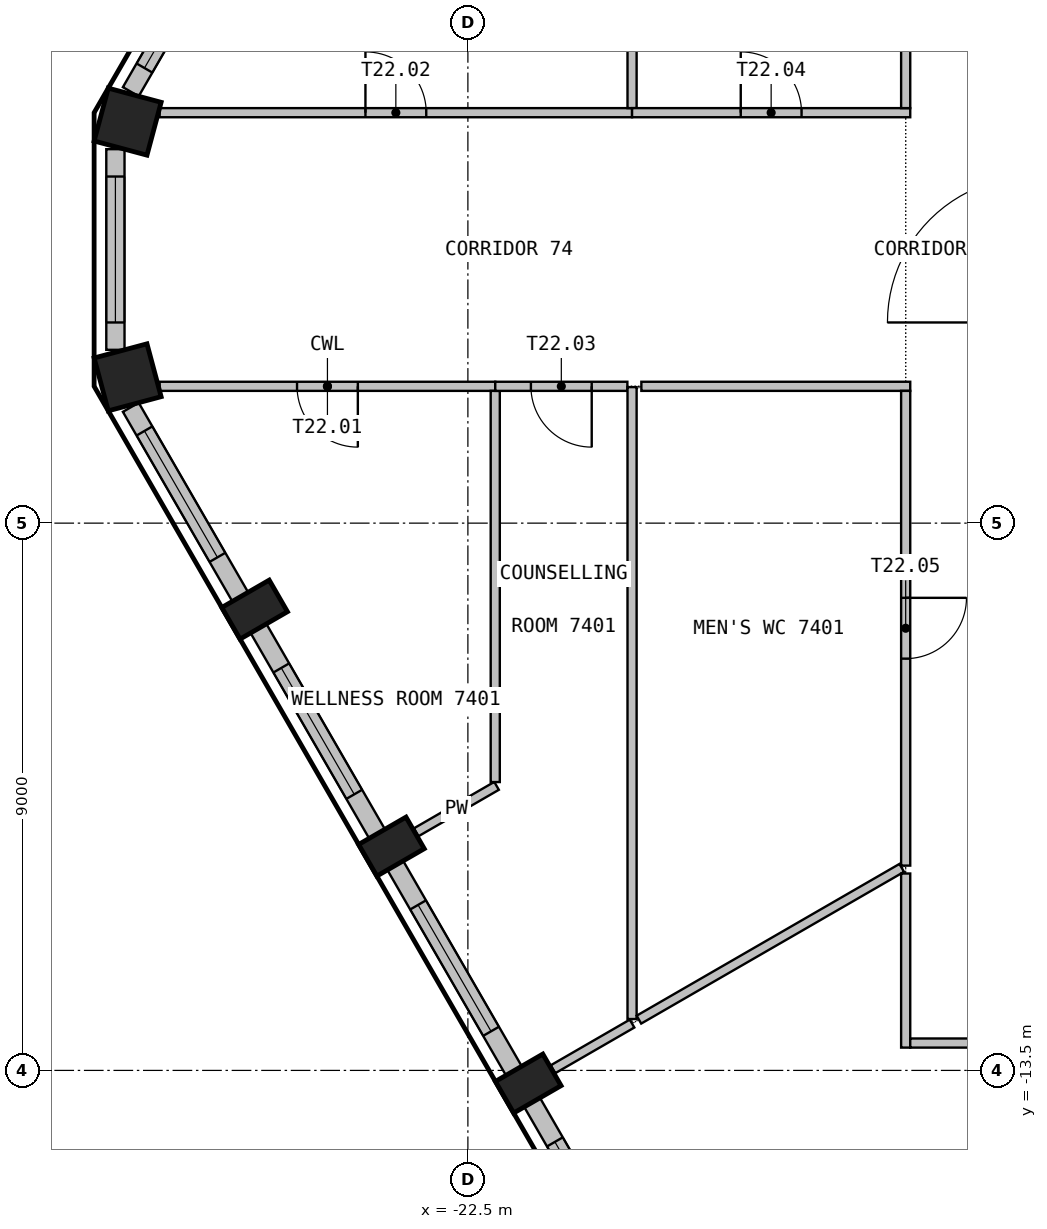
"""IFC4 building model, lengths in metres.
Left out: names, types, materials, properties, quantities, classifications, styles, units other than length and angle.
Written with IfcOpenShell. Run it as: python <this file> out.ifc"""

import sys

from ifc_helpers import new_model, si_unit, direction, frame, frame_2d, origin, origin_2d, place, context, subcontext, project, spatial, rectangle, extrude, element, fill, save


model = new_model("IFC4")
c1 = context("Model", 3, precision=1e-05, world=origin(), true_north=direction((0.0, 1.0)))
c2 = subcontext(c1, "Body", "Model", "MODEL_VIEW")
j1 = project(units=[si_unit("LENGTHUNIT", "METRE"), si_unit("PLANEANGLEUNIT", "RADIAN")], contexts=[c1])
p1 = place(None, origin())
s1 = spatial("IfcSite", under=j1, at=p1, CompositionType="ELEMENT")
p2 = place(p1, origin())
s2 = spatial("IfcBuilding", under=s1, at=p2, CompositionType="ELEMENT")
p3 = place(p2, frame((0.0, 0.0, 298.2)))
s3 = spatial("IfcBuildingStorey", under=s2, at=p3, CompositionType="ELEMENT", Elevation=298.2)
for number, where, z_axis, x_axis in (
    (1, (-28.096, 2.102, 0.0), (0.0, 0.0, 1.0), (-0.259, -0.966, 0.0)),
    (2, (-28.096, -2.102, 0.0), (0.0, 0.0, 1.0), (0.259, -0.966, 0.0)),
):
    element("IfcColumn", number, at=place(p3, frame(where, z_axis=z_axis, x_axis=x_axis)), inside=s3, PredefinedType="COLUMN", context=c2, shape_type="SweptSolid", body=[
        extrude(rectangle(XDim=0.9, YDim=0.9, at=origin_2d()), origin(), (0.0, 0.0, 1.0), 3.575),
    ])
for number, where, z_axis, x_axis in (
    (3, (-26.007, -5.922, 0.0), (0.0, 0.0, 1.0), (0.5, -0.866, 0.0)),
    (4, (-23.757, -9.819, 0.0), (0.0, 0.0, 1.0), (0.5, -0.866, 0.0)),
    (5, (-21.507, -13.716, 0.0), (0.0, 0.0, 1.0), (0.5, -0.866, 0.0)),
):
    element("IfcColumn", number, at=place(p3, frame(where, z_axis=z_axis, x_axis=x_axis)), inside=s3, PredefinedType="COLUMN", context=c2, shape_type="SweptSolid", body=[
        extrude(rectangle(XDim=0.6, YDim=0.9, at=origin_2d()), origin(), (0.0, 0.0, 1.0), 3.575),
    ])
p4 = place(p3, frame((-26.244, 5.712, 0.0), z_axis=(0.0, 0.0, 1.0), x_axis=(-0.499969057507, -0.866043267704, 0.0)))
e6 = element("IfcWall", 6, at=p4, inside=s3, PredefinedType="SOLIDWALL", context=c2, shape_type="SweptSolid", body=[
    extrude(rectangle(XDim=3.599, YDim=0.3, at=frame_2d((1.8, 0.0))), origin(), (0.0, 0.0, 1.0), 3.575),
])
p5 = place(p4, frame((0.75, 0.0, 0.9)))
e7 = element("IfcOpeningElement", 7, at=p5, cuts=e6, PredefinedType="OPENING", context=c2, shape_type="SweptSolid", body=[
    extrude(rectangle(XDim=2.4, YDim=2.1, at=frame_2d((1.2, 1.05))), frame((0.0, 0.16, 0.0), z_axis=(0.0, -1.0, 0.0), x_axis=(1.0, 0.0, 0.0)), (0.0, 0.0, 1.0), 0.32),
])
p6 = place(p3, frame((-28.297, 1.65, 0.0), z_axis=(0.0, 0.0, 1.0), x_axis=(0.0, -1.0, 0.0)))
e8 = element("IfcWall", 8, at=p6, inside=s3, PredefinedType="SOLIDWALL", context=c2, shape_type="SweptSolid", body=[
    extrude(rectangle(XDim=3.3, YDim=0.3, at=frame_2d((1.65, 0.0))), origin(), (0.0, 0.0, 1.0), 3.575),
])
p7 = place(p6, frame((0.45, 0.0, 0.9)))
e9 = element("IfcOpeningElement", 9, at=p7, cuts=e8, PredefinedType="OPENING", context=c2, shape_type="SweptSolid", body=[
    extrude(rectangle(XDim=2.4, YDim=2.1, at=frame_2d((1.2, 1.05))), frame((0.0, 0.16, 0.0), z_axis=(0.0, -1.0, 0.0), x_axis=(1.0, 0.0, 0.0)), (0.0, 0.0, 1.0), 0.32),
])
p8 = place(p3, frame((-28.044, -2.595, 0.0), z_axis=(0.0, 0.0, 1.0), x_axis=(0.499969057507, -0.866043267704, 0.0)))
e10 = element("IfcWall", 10, at=p8, inside=s3, PredefinedType="SOLIDWALL", context=c2, shape_type="SweptSolid", body=[
    extrude(rectangle(XDim=3.599, YDim=0.3, at=frame_2d((1.8, 0.0))), origin(), (0.0, 0.0, 1.0), 3.575),
])
p9 = place(p8, frame((0.45, 0.0, 0.9)))
e11 = element("IfcOpeningElement", 11, at=p9, cuts=e10, PredefinedType="OPENING", context=c2, shape_type="SweptSolid", body=[
    extrude(rectangle(XDim=2.4, YDim=2.1, at=frame_2d((1.2, 1.05))), frame((0.0, 0.16, 0.0), z_axis=(0.0, -1.0, 0.0), x_axis=(1.0, 0.0, 0.0)), (0.0, 0.0, 1.0), 0.32),
])
p10 = place(p3, frame((-25.944, -6.232, 0.0), z_axis=(0.0, 0.0, 1.0), x_axis=(0.500011542666, -0.866018739521, 0.0)))
e12 = element("IfcWall", 12, at=p10, inside=s3, PredefinedType="SOLIDWALL", context=c2, shape_type="SweptSolid", body=[
    extrude(rectangle(XDim=3.899, YDim=0.3, at=frame_2d((1.949, 0.0))), origin(), (0.0, 0.0, 1.0), 3.575),
])
p11 = place(p10, frame((0.75, 0.0, 0.9)))
e13 = element("IfcOpeningElement", 13, at=p11, cuts=e12, PredefinedType="OPENING", context=c2, shape_type="SweptSolid", body=[
    extrude(rectangle(XDim=2.4, YDim=2.1, at=frame_2d((1.2, 1.05))), frame((0.0, 0.16, 0.0), z_axis=(0.0, -1.0, 0.0), x_axis=(1.0, 0.0, 0.0)), (0.0, 0.0, 1.0), 0.32),
])
p12 = place(p3, frame((-23.694, -10.129, 0.0), z_axis=(0.0, 0.0, 1.0), x_axis=(0.499984428715, -0.866034393683, 0.0)))
e14 = element("IfcWall", 14, at=p12, inside=s3, PredefinedType="SOLIDWALL", context=c2, shape_type="SweptSolid", body=[
    extrude(rectangle(XDim=3.899, YDim=0.3, at=frame_2d((1.949, 0.0))), origin(), (0.0, 0.0, 1.0), 3.575),
])
p13 = place(p12, frame((0.75, 0.0, 0.9)))
e15 = element("IfcOpeningElement", 15, at=p13, cuts=e14, PredefinedType="OPENING", context=c2, shape_type="SweptSolid", body=[
    extrude(rectangle(XDim=2.4, YDim=2.1, at=frame_2d((1.2, 1.05))), frame((0.0, 0.16, 0.0), z_axis=(0.0, -1.0, 0.0), x_axis=(1.0, 0.0, 0.0)), (0.0, 0.0, 1.0), 0.32),
])
p14 = place(p3, frame((-21.444, -14.027, 0.0), z_axis=(0.0, 0.0, 1.0), x_axis=(0.50001992892, -0.866013897511, 0.0)))
e16 = element("IfcWall", 16, at=p14, inside=s3, PredefinedType="SOLIDWALL", context=c2, shape_type="SweptSolid", body=[
    extrude(rectangle(XDim=3.599, YDim=0.3, at=frame_2d((1.8, 0.0))), origin(), (0.0, 0.0, 1.0), 3.575),
])
p15 = place(p14, frame((0.75, 0.0, 0.9)))
e17 = element("IfcOpeningElement", 17, at=p15, cuts=e16, PredefinedType="OPENING", context=c2, shape_type="SweptSolid", body=[
    extrude(rectangle(XDim=2.4, YDim=2.1, at=frame_2d((1.2, 1.05))), frame((0.0, 0.16, 0.0), z_axis=(0.0, -1.0, 0.0), x_axis=(1.0, 0.0, 0.0)), (0.0, 0.0, 1.0), 0.32),
])
p16 = place(p3, frame((-22.05, -2.25, 0.0), z_axis=(0.0, 0.0, 1.0), x_axis=(-1.0, 0.0, 0.0)))
e18 = element("IfcWall", 18, at=p16, inside=s3, PredefinedType="PARTITIONING", context=c2, shape_type="SweptSolid", body=[
    extrude(rectangle(XDim=5.52, YDim=0.15, at=frame_2d((2.76, 0.0))), origin(), (0.0, 0.0, 1.0), 3.575),
])
p17 = place(p16, frame((2.26, 0.0, 0.0)))
e19 = element("IfcOpeningElement", 19, at=p17, cuts=e18, PredefinedType="OPENING", context=c2, shape_type="SweptSolid", body=[
    extrude(rectangle(XDim=1.0, YDim=2.1, at=frame_2d((0.5, 1.05))), frame((0.0, 0.085, 0.0), z_axis=(0.0, -1.0, 0.0), x_axis=(1.0, 0.0, 0.0)), (0.0, 0.0, 1.0), 0.17),
])
p18 = place(p3, frame((-27.57, 2.25, 0.0), z_axis=(0.0, 0.0, 1.0), x_axis=(1.0, 0.0, 0.0)))
e20 = element("IfcWall", 20, at=p18, inside=s3, PredefinedType="PARTITIONING", context=c2, shape_type="SweptSolid", body=[
    extrude(rectangle(XDim=7.77, YDim=0.15, at=frame_2d((3.885, 0.0))), origin(), (0.0, 0.0, 1.0), 3.575),
])
p19 = place(p18, frame((3.385, 0.0, 0.0)))
e21 = element("IfcOpeningElement", 21, at=p19, cuts=e20, PredefinedType="OPENING", context=c2, shape_type="SweptSolid", body=[
    extrude(rectangle(XDim=1.0, YDim=2.1, at=frame_2d((0.5, 1.05))), frame((0.0, 0.085, 0.0), z_axis=(0.0, -1.0, 0.0), x_axis=(1.0, 0.0, 0.0)), (0.0, 0.0, 1.0), 0.17),
])
p20 = place(p3, frame((-22.028, -8.821, 0.0), z_axis=(0.0, 0.0, 1.0), x_axis=(-0.86598050703, -0.500077755398, 0.0)))
e22 = element("IfcWall", 22, at=p20, inside=s3, PredefinedType="PARTITIONING", context=c2, shape_type="SweptSolid", body=[
    extrude(rectangle(XDim=1.527, YDim=0.15, at=frame_2d((0.763, 0.0))), origin(), (0.0, 0.0, 1.0), 3.575),
])
p21 = place(p3, frame((-22.05, -2.325, 0.0), z_axis=(0.0, 0.0, 1.0), x_axis=(0.0, -1.0, 0.0)))
e23 = element("IfcWall", 23, at=p21, inside=s3, PredefinedType="PARTITIONING", context=c2, shape_type="SweptSolid", body=[
    extrude(rectangle(XDim=6.433, YDim=0.15, at=frame_2d((3.217, 0.0))), origin(), (0.0, 0.0, 1.0), 3.575),
])
p22 = place(p3, frame((-19.877, -2.25, 0.0), z_axis=(0.0, 0.0, 1.0), x_axis=(-1.0, 0.0, 0.0)))
e24 = element("IfcWall", 24, at=p22, inside=s3, PredefinedType="PARTITIONING", context=c2, shape_type="SweptSolid", body=[
    extrude(rectangle(XDim=2.173, YDim=0.15, at=frame_2d((1.086, 0.0))), origin(), (0.0, 0.0, 1.0), 3.575),
])
p23 = place(p22, frame((0.586, 0.0, 0.0)))
e25 = element("IfcOpeningElement", 25, at=p23, cuts=e24, PredefinedType="OPENING", context=c2, shape_type="SweptSolid", body=[
    extrude(rectangle(XDim=1.0, YDim=2.1, at=frame_2d((0.5, 1.05))), frame((0.0, 0.085, 0.0), z_axis=(0.0, -1.0, 0.0), x_axis=(1.0, 0.0, 0.0)), (0.0, 0.0, 1.0), 0.17),
])
p24 = place(p3, frame((-19.8, -12.73, 0.0), z_axis=(0.0, 0.0, 1.0), x_axis=(-0.865922963245, -0.500177390258, 0.0)))
e26 = element("IfcWall", 26, at=p24, inside=s3, PredefinedType="PARTITIONING", context=c2, shape_type="SweptSolid", body=[
    extrude(rectangle(XDim=1.502, YDim=0.15, at=frame_2d((0.751, 0.0))), origin(), (0.0, 0.0, 1.0), 3.575),
])
p25 = place(p3, frame((-19.8, -2.263, 0.0), z_axis=(0.0, 0.0, 1.0), x_axis=(0.0, -1.0, 0.0)))
e27 = element("IfcWall", 27, at=p25, inside=s3, PredefinedType="PARTITIONING", context=c2, shape_type="SweptSolid", body=[
    extrude(rectangle(XDim=10.392, YDim=0.15, at=frame_2d((5.196, 0.0))), origin(), (0.0, 0.0, 1.0), 3.575),
])
p26 = place(p3, frame((-15.365, -10.169, 0.0), z_axis=(0.0, 0.0, 1.0), x_axis=(-0.866025118187, -0.500000494669, 0.0)))
e28 = element("IfcWall", 28, at=p26, inside=s3, PredefinedType="PARTITIONING", context=c2, shape_type="SweptSolid", body=[
    extrude(rectangle(XDim=4.991, YDim=0.15, at=frame_2d((2.496, 0.0))), origin(), (0.0, 0.0, 1.0), 3.575),
])
p27 = place(p3, frame((-19.8, 7.459, 0.0), z_axis=(0.0, 0.0, 1.0), x_axis=(0.0, -1.0, 0.0)))
e29 = element("IfcWall", 29, at=p27, inside=s3, PredefinedType="PARTITIONING", context=c2, shape_type="SweptSolid", body=[
    extrude(rectangle(XDim=5.134, YDim=0.15, at=frame_2d((2.567, 0.0))), origin(), (0.0, 0.0, 1.0), 3.575),
])
p28 = place(p3, frame((-19.8, 2.25, 0.0), z_axis=(0.0, 0.0, 1.0), x_axis=(1.0, 0.0, 0.0)))
e30 = element("IfcWall", 30, at=p28, inside=s3, PredefinedType="PARTITIONING", context=c2, shape_type="SweptSolid", body=[
    extrude(rectangle(XDim=4.575, YDim=0.15, at=frame_2d((2.288, 0.0))), origin(), (0.0, 0.0, 1.0), 3.575),
])
p29 = place(p28, frame((1.788, 0.0, 0.0)))
e31 = element("IfcOpeningElement", 31, at=p29, cuts=e30, PredefinedType="OPENING", context=c2, shape_type="SweptSolid", body=[
    extrude(rectangle(XDim=1.0, YDim=2.1, at=frame_2d((0.5, 1.05))), frame((0.0, 0.085, 0.0), z_axis=(0.0, -1.0, 0.0), x_axis=(1.0, 0.0, 0.0)), (0.0, 0.0, 1.0), 0.17),
])
p30 = place(p3, frame((-15.225, -2.25, 0.0), z_axis=(0.0, 0.0, 1.0), x_axis=(-1.0, 0.0, 0.0)))
e32 = element("IfcWall", 32, at=p30, inside=s3, PredefinedType="PARTITIONING", context=c2, shape_type="SweptSolid", body=[
    extrude(rectangle(XDim=4.422, YDim=0.15, at=frame_2d((2.211, 0.0))), origin(), (0.0, 0.0, 1.0), 3.575),
])
p31 = place(p3, frame((-15.3, -10.262, 0.0), z_axis=(0.0, 0.0, 1.0), x_axis=(0.0, -1.0, 0.0)))
e33 = element("IfcWall", 33, at=p31, inside=s3, PredefinedType="PARTITIONING", context=c2, shape_type="SweptSolid", body=[
    extrude(rectangle(XDim=2.863, YDim=0.15, at=frame_2d((1.432, 0.0))), origin(), (0.0, 0.0, 1.0), 3.575),
])
p32 = place(p3, frame((-15.225, -13.05, 0.0), z_axis=(0.0, 0.0, 1.0), x_axis=(1.0, 0.0, 0.0)))
e34 = element("IfcWall", 34, at=p32, inside=s3, PredefinedType="PARTITIONING", context=c2, shape_type="SweptSolid", body=[
    extrude(rectangle(XDim=3.975, YDim=0.15, at=frame_2d((1.988, 0.0))), origin(), (0.0, 0.0, 1.0), 3.575),
])
p33 = place(p32, frame((1.488, 0.0, 0.0)))
e35 = element("IfcOpeningElement", 35, at=p33, cuts=e34, PredefinedType="OPENING", context=c2, shape_type="SweptSolid", body=[
    extrude(rectangle(XDim=1.0, YDim=2.1, at=frame_2d((0.5, 1.05))), frame((0.0, 0.085, 0.0), z_axis=(0.0, -1.0, 0.0), x_axis=(1.0, 0.0, 0.0)), (0.0, 0.0, 1.0), 0.17),
])
p34 = place(p3, frame((-15.3, -2.325, 0.0), z_axis=(0.0, 0.0, 1.0), x_axis=(0.0, -1.0, 0.0)))
e36 = element("IfcWall", 36, at=p34, inside=s3, PredefinedType="PARTITIONING", context=c2, shape_type="SweptSolid", body=[
    extrude(rectangle(XDim=7.807, YDim=0.15, at=frame_2d((3.904, 0.0))), origin(), (0.0, 0.0, 1.0), 3.575),
])
p35 = place(p34, frame((3.404, 0.0, 0.0)))
e37 = element("IfcOpeningElement", 37, at=p35, cuts=e36, PredefinedType="OPENING", context=c2, shape_type="SweptSolid", body=[
    extrude(rectangle(XDim=1.0, YDim=2.1, at=frame_2d((0.5, 1.05))), frame((0.0, 0.085, 0.0), z_axis=(0.0, -1.0, 0.0), x_axis=(1.0, 0.0, 0.0)), (0.0, 0.0, 1.0), 0.17),
])
p36 = place(p3, frame((-15.3, 4.936, 0.0), z_axis=(0.0, 0.0, 1.0), x_axis=(0.0, -1.0, 0.0)))
e38 = element("IfcWall", 38, at=p36, inside=s3, PredefinedType="PARTITIONING", context=c2, shape_type="SweptSolid", body=[
    extrude(rectangle(XDim=2.611, YDim=0.15, at=frame_2d((1.306, 0.0))), origin(), (0.0, 0.0, 1.0), 3.575),
])
p37 = place(p5, origin())
e39 = element("IfcWindow", 39, at=p37, inside=s3, PartitioningType="SINGLE_PANEL", PredefinedType="WINDOW", context=c2, shape_type="SweptSolid", body=[
    extrude(rectangle(XDim=2.4, YDim=2.1, at=frame_2d((1.2, 1.05))), frame((0.0, 0.03, 0.0), z_axis=(0.0, -1.0, 0.0), x_axis=(1.0, 0.0, 0.0)), (0.0, 0.0, 1.0), 0.06),
])
fill(e7, e39)
p38 = place(p7, origin())
e40 = element("IfcWindow", 40, at=p38, inside=s3, PartitioningType="SINGLE_PANEL", PredefinedType="WINDOW", context=c2, shape_type="SweptSolid", body=[
    extrude(rectangle(XDim=2.4, YDim=2.1, at=frame_2d((1.2, 1.05))), frame((0.0, 0.03, 0.0), z_axis=(0.0, -1.0, 0.0), x_axis=(1.0, 0.0, 0.0)), (0.0, 0.0, 1.0), 0.06),
])
fill(e9, e40)
p39 = place(p9, origin())
e41 = element("IfcWindow", 41, at=p39, inside=s3, PartitioningType="SINGLE_PANEL", PredefinedType="WINDOW", context=c2, shape_type="SweptSolid", body=[
    extrude(rectangle(XDim=2.4, YDim=2.1, at=frame_2d((1.2, 1.05))), frame((0.0, 0.03, 0.0), z_axis=(0.0, -1.0, 0.0), x_axis=(1.0, 0.0, 0.0)), (0.0, 0.0, 1.0), 0.06),
])
fill(e11, e41)
p40 = place(p11, origin())
e42 = element("IfcWindow", 42, at=p40, inside=s3, PartitioningType="SINGLE_PANEL", PredefinedType="WINDOW", context=c2, shape_type="SweptSolid", body=[
    extrude(rectangle(XDim=2.4, YDim=2.1, at=frame_2d((1.2, 1.05))), frame((0.0, 0.03, 0.0), z_axis=(0.0, -1.0, 0.0), x_axis=(1.0, 0.0, 0.0)), (0.0, 0.0, 1.0), 0.06),
])
fill(e13, e42)
p41 = place(p13, origin())
e43 = element("IfcWindow", 43, at=p41, inside=s3, PartitioningType="SINGLE_PANEL", PredefinedType="WINDOW", context=c2, shape_type="SweptSolid", body=[
    extrude(rectangle(XDim=2.4, YDim=2.1, at=frame_2d((1.2, 1.05))), frame((0.0, 0.03, 0.0), z_axis=(0.0, -1.0, 0.0), x_axis=(1.0, 0.0, 0.0)), (0.0, 0.0, 1.0), 0.06),
])
fill(e15, e43)
p42 = place(p15, origin())
e44 = element("IfcWindow", 44, at=p42, inside=s3, PartitioningType="SINGLE_PANEL", PredefinedType="WINDOW", context=c2, shape_type="SweptSolid", body=[
    extrude(rectangle(XDim=2.4, YDim=2.1, at=frame_2d((1.2, 1.05))), frame((0.0, 0.03, 0.0), z_axis=(0.0, -1.0, 0.0), x_axis=(1.0, 0.0, 0.0)), (0.0, 0.0, 1.0), 0.06),
])
fill(e17, e44)
p43 = place(p17, origin())
e45 = element("IfcDoor", 45, at=p43, inside=s3, OperationType="SINGLE_SWING_LEFT", PredefinedType="DOOR", context=c2, shape_type="SweptSolid", body=[
    extrude(rectangle(XDim=1.0, YDim=2.1, at=frame_2d((0.5, 1.05))), frame((0.0, 0.025, 0.0), z_axis=(0.0, -1.0, 0.0), x_axis=(1.0, 0.0, 0.0)), (0.0, 0.0, 1.0), 0.05),
])
fill(e19, e45)
p44 = place(p19, origin())
e46 = element("IfcDoor", 46, at=p44, inside=s3, OperationType="SINGLE_SWING_RIGHT", PredefinedType="DOOR", context=c2, shape_type="SweptSolid", body=[
    extrude(rectangle(XDim=1.0, YDim=2.1, at=frame_2d((0.5, 1.05))), frame((0.0, 0.025, 0.0), z_axis=(0.0, -1.0, 0.0), x_axis=(1.0, 0.0, 0.0)), (0.0, 0.0, 1.0), 0.05),
])
fill(e21, e46)
p45 = place(p23, origin())
e47 = element("IfcDoor", 47, at=p45, inside=s3, OperationType="SINGLE_SWING_LEFT", PredefinedType="DOOR", context=c2, shape_type="SweptSolid", body=[
    extrude(rectangle(XDim=1.0, YDim=2.1, at=frame_2d((0.5, 1.05))), frame((0.0, 0.025, 0.0), z_axis=(0.0, -1.0, 0.0), x_axis=(1.0, 0.0, 0.0)), (0.0, 0.0, 1.0), 0.05),
])
fill(e25, e47)
p46 = place(p29, origin())
e48 = element("IfcDoor", 48, at=p46, inside=s3, OperationType="SINGLE_SWING_RIGHT", PredefinedType="DOOR", context=c2, shape_type="SweptSolid", body=[
    extrude(rectangle(XDim=1.0, YDim=2.1, at=frame_2d((0.5, 1.05))), frame((0.0, 0.025, 0.0), z_axis=(0.0, -1.0, 0.0), x_axis=(1.0, 0.0, 0.0)), (0.0, 0.0, 1.0), 0.05),
])
fill(e31, e48)
p47 = place(p35, origin())
e49 = element("IfcDoor", 49, at=p47, inside=s3, OperationType="SINGLE_SWING_RIGHT", PredefinedType="DOOR", context=c2, shape_type="SweptSolid", body=[
    extrude(rectangle(XDim=1.0, YDim=2.1, at=frame_2d((0.5, 1.05))), frame((0.0, 0.025, 0.0), z_axis=(0.0, -1.0, 0.0), x_axis=(1.0, 0.0, 0.0)), (0.0, 0.0, 1.0), 0.05),
])
fill(e37, e49)
save(model, sys.argv[1])
